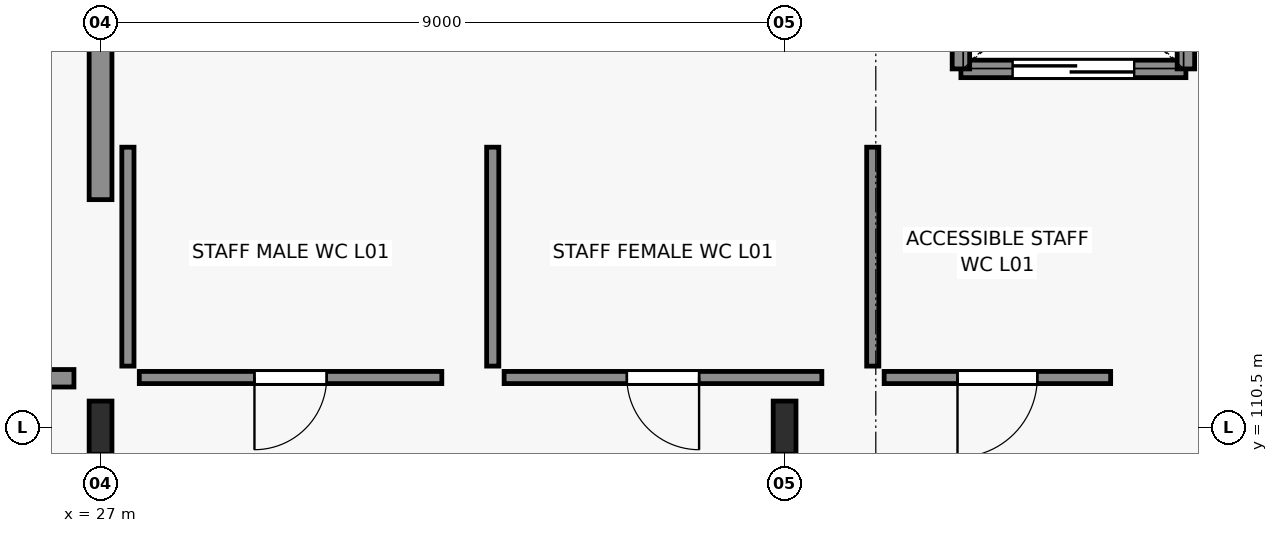
"""IFC4 building model, lengths in metres.
Left out: names, types, materials, properties, quantities, classifications, styles, units other than length and angle.
Written with IfcOpenShell. Run it as: python <this file> out.ifc"""

import sys

from ifc_helpers import new_model, si_unit, direction, frame, frame_2d, origin, origin_2d, place, context, subcontext, project, spatial, rectangle, i_section, extrude, element, fill, save


model = new_model("IFC4")
c1 = context("Model", 3, precision=1e-05, world=origin(), true_north=direction((0.0, 1.0)))
c2 = subcontext(c1, "Body", "Model", "MODEL_VIEW")
j1 = project(units=[si_unit("LENGTHUNIT", "METRE"), si_unit("PLANEANGLEUNIT", "RADIAN")], contexts=[c1])
p1 = place(None, origin())
s1 = spatial("IfcSite", under=j1, at=p1, CompositionType="ELEMENT")
p2 = place(p1, origin())
s2 = spatial("IfcBuilding", under=s1, at=p2, CompositionType="ELEMENT")
p3 = place(p2, frame((0.0, 0.0, 4.8)))
s3 = spatial("IfcBuildingStorey", under=s2, at=p3, CompositionType="ELEMENT", Elevation=4.8)
for number, where, z_axis, x_axis in (
    (1, (27.0, 110.5, 0.0), (0.0, 0.0, 1.0), (1.0, 0.0, 0.0)),
    (2, (36.0, 110.5, 0.0), (0.0, 0.0, 1.0), (1.0, 0.0, 0.0)),
):
    element("IfcColumn", number, at=place(p3, frame(where, z_axis=z_axis, x_axis=x_axis)), inside=s3, PredefinedType="COLUMN", context=c2, shape_type="SweptSolid", body=[
        extrude(i_section(OverallWidth=0.3, OverallDepth=0.7, WebThickness=0.017, FlangeThickness=0.032, FilletRadius=0.027, at=origin_2d()), origin(), (0.0, 0.0, 1.0), 4.82),
    ])
p4 = place(p3, frame((27.0, 113.5, 0.0), z_axis=(0.0, 0.0, 1.0), x_axis=(0.0, 1.0, 0.0)))
e3 = element("IfcWall", 3, at=p4, inside=s3, PredefinedType="SHEAR", context=c2, shape_type="SweptSolid", body=[
    extrude(rectangle(XDim=4.825, YDim=0.3, at=frame_2d((2.413, 0.0))), origin(), (0.0, 0.0, 1.0), 4.82),
])
p5 = place(p3, frame((31.49, 111.16, 0.0), z_axis=(0.0, 0.0, 1.0), x_axis=(-1.0, 0.0, 0.0)))
e4 = element("IfcWall", 4, at=p5, inside=s3, PredefinedType="PARTITIONING", context=c2, shape_type="SweptSolid", body=[
    extrude(rectangle(XDim=3.98, YDim=0.16, at=frame_2d((1.99, 0.0))), origin(), (0.0, 0.0, 1.0), 4.55),
])
p6 = place(p5, frame((1.515, 0.0, 0.0)))
e5 = element("IfcOpeningElement", 5, at=p6, cuts=e4, PredefinedType="OPENING", context=c2, shape_type="SweptSolid", body=[
    extrude(rectangle(XDim=0.95, YDim=2.15, at=frame_2d((0.475, 1.075))), frame((0.0, 0.09, 0.0), z_axis=(0.0, -1.0, 0.0), x_axis=(1.0, 0.0, 0.0)), (0.0, 0.0, 1.0), 0.18),
])
p7 = place(p3, frame((27.36, 111.31, 0.0), z_axis=(0.0, 0.0, 1.0), x_axis=(0.0, 1.0, 0.0)))
e6 = element("IfcWall", 6, at=p7, inside=s3, PredefinedType="PARTITIONING", context=c2, shape_type="SweptSolid", body=[
    extrude(rectangle(XDim=2.88, YDim=0.16, at=frame_2d((1.44, 0.0))), origin(), (0.0, 0.0, 1.0), 4.75),
])
p8 = place(p3, frame((36.49, 111.16, 0.0), z_axis=(0.0, 0.0, 1.0), x_axis=(-1.0, 0.0, 0.0)))
e7 = element("IfcWall", 7, at=p8, inside=s3, PredefinedType="PARTITIONING", context=c2, shape_type="SweptSolid", body=[
    extrude(rectangle(XDim=4.18, YDim=0.16, at=frame_2d((2.09, 0.0))), origin(), (0.0, 0.0, 1.0), 4.3),
])
p9 = place(p8, frame((1.615, 0.0, 0.0)))
e8 = element("IfcOpeningElement", 8, at=p9, cuts=e7, PredefinedType="OPENING", context=c2, shape_type="SweptSolid", body=[
    extrude(rectangle(XDim=0.95, YDim=2.15, at=frame_2d((0.475, 1.075))), frame((0.0, 0.09, 0.0), z_axis=(0.0, -1.0, 0.0), x_axis=(1.0, 0.0, 0.0)), (0.0, 0.0, 1.0), 0.18),
])
p10 = place(p3, frame((32.16, 111.31, 0.0), z_axis=(0.0, 0.0, 1.0), x_axis=(0.0, 1.0, 0.0)))
e9 = element("IfcWall", 9, at=p10, inside=s3, PredefinedType="PARTITIONING", context=c2, shape_type="SweptSolid", body=[
    extrude(rectangle(XDim=2.88, YDim=0.16, at=frame_2d((1.44, 0.0))), origin(), (0.0, 0.0, 1.0), 4.75),
])
p11 = place(p3, frame((40.29, 111.16, 0.0), z_axis=(0.0, 0.0, 1.0), x_axis=(-1.0, 0.0, 0.0)))
e10 = element("IfcWall", 10, at=p11, inside=s3, PredefinedType="PARTITIONING", context=c2, shape_type="SweptSolid", body=[
    extrude(rectangle(XDim=2.98, YDim=0.16, at=frame_2d((1.49, 0.0))), origin(), (0.0, 0.0, 1.0), 4.55),
])
p12 = place(p11, frame((0.965, 0.0, 0.0)))
e11 = element("IfcOpeningElement", 11, at=p12, cuts=e10, PredefinedType="OPENING", context=c2, shape_type="SweptSolid", body=[
    extrude(rectangle(XDim=1.05, YDim=2.2, at=frame_2d((0.525, 1.1))), frame((0.0, 0.09, 0.0), z_axis=(0.0, -1.0, 0.0), x_axis=(1.0, 0.0, 0.0)), (0.0, 0.0, 1.0), 0.18),
])
p13 = place(p3, frame((37.16, 111.31, 0.0), z_axis=(0.0, 0.0, 1.0), x_axis=(0.0, 1.0, 0.0)))
e12 = element("IfcWall", 12, at=p13, inside=s3, PredefinedType="PARTITIONING", context=c2, shape_type="SweptSolid", body=[
    extrude(rectangle(XDim=2.88, YDim=0.16, at=frame_2d((1.44, 0.0))), origin(), (0.0, 0.0, 1.0), 4.75),
])
p14 = place(p3, frame((41.28, 115.22, 0.0), z_axis=(0.0, 0.0, 1.0), x_axis=(-1.0, 0.0, 0.0)))
e13 = element("IfcWall", 13, at=p14, inside=s3, PredefinedType="SOLIDWALL", context=c2, shape_type="SweptSolid", body=[
    extrude(rectangle(XDim=2.96, YDim=0.23, at=frame_2d((1.48, 0.0))), origin(), (0.0, 0.0, 1.0), 4.55),
])
p15 = place(p14, frame((0.68, 0.0, 0.0)))
e14 = element("IfcOpeningElement", 14, at=p15, cuts=e13, PredefinedType="OPENING", context=c2, shape_type="SweptSolid", body=[
    extrude(rectangle(XDim=1.6, YDim=2.3, at=frame_2d((0.8, 1.15))), frame((0.0, 0.125, 0.0), z_axis=(0.0, -1.0, 0.0), x_axis=(1.0, 0.0, 0.0)), (0.0, 0.0, 1.0), 0.25),
])
for number, where, z_axis, x_axis in (
    (15, (38.32, 115.22, 0.0), (0.0, 0.0, 1.0), (0.0, 1.0, 0.0)),
    (16, (41.28, 117.78, 0.0), (0.0, 0.0, 1.0), (0.0, -1.0, 0.0)),
):
    element("IfcWall", number, at=place(p3, frame(where, z_axis=z_axis, x_axis=x_axis)), inside=s3, PredefinedType="SOLIDWALL", context=c2, shape_type="SweptSolid", body=[
        extrude(rectangle(XDim=2.56, YDim=0.23, at=frame_2d((1.28, 0.0))), origin(), (0.0, 0.0, 1.0), 4.76),
    ])
p16 = place(p3, frame((15.3, 111.15, 0.0), z_axis=(0.0, 0.0, 1.0), x_axis=(1.0, 0.0, 0.0)))
e17 = element("IfcWall", 17, at=p16, inside=s3, PredefinedType="SOLIDWALL", context=c2, shape_type="SweptSolid", body=[
    extrude(rectangle(XDim=11.35, YDim=0.23, at=frame_2d((5.675, 0.0))), origin(), (0.0, 0.0, 1.0), 4.3),
])
p17 = place(p16, frame((0.55, 0.0, 0.0)))
e18 = element("IfcOpeningElement", 18, at=p17, cuts=e17, PredefinedType="OPENING", context=c2, shape_type="SweptSolid", body=[
    extrude(rectangle(XDim=1.8, YDim=2.3, at=frame_2d((0.9, 1.15))), frame((0.0, 0.125, 0.0), z_axis=(0.0, -1.0, 0.0), x_axis=(1.0, 0.0, 0.0)), (0.0, 0.0, 1.0), 0.25),
])
p18 = place(p6, origin())
e19 = element("IfcDoor", 19, at=p18, inside=s3, OperationType="SINGLE_SWING_RIGHT", PredefinedType="DOOR", context=c2, shape_type="SweptSolid", body=[
    extrude(rectangle(XDim=0.95, YDim=2.15, at=frame_2d((0.475, 1.075))), frame((0.0, 0.025, 0.0), z_axis=(0.0, -1.0, 0.0), x_axis=(1.0, 0.0, 0.0)), (0.0, 0.0, 1.0), 0.05),
])
fill(e5, e19)
p19 = place(p9, origin())
e20 = element("IfcDoor", 20, at=p19, inside=s3, OperationType="SINGLE_SWING_LEFT", PredefinedType="DOOR", context=c2, shape_type="SweptSolid", body=[
    extrude(rectangle(XDim=0.95, YDim=2.15, at=frame_2d((0.475, 1.075))), frame((0.0, 0.025, 0.0), z_axis=(0.0, -1.0, 0.0), x_axis=(1.0, 0.0, 0.0)), (0.0, 0.0, 1.0), 0.05),
])
fill(e8, e20)
p20 = place(p12, origin())
e21 = element("IfcDoor", 21, at=p20, inside=s3, OperationType="SINGLE_SWING_RIGHT", PredefinedType="DOOR", context=c2, shape_type="SweptSolid", body=[
    extrude(rectangle(XDim=1.05, YDim=2.2, at=frame_2d((0.525, 1.1))), frame((0.0, 0.025, 0.0), z_axis=(0.0, -1.0, 0.0), x_axis=(1.0, 0.0, 0.0)), (0.0, 0.0, 1.0), 0.05),
])
fill(e11, e21)
p21 = place(p15, origin())
e22 = element("IfcDoor", 22, at=p21, inside=s3, OperationType="DOUBLE_DOOR_SLIDING", PredefinedType="DOOR", context=c2, shape_type="SweptSolid", body=[
    extrude(rectangle(XDim=1.6, YDim=2.3, at=frame_2d((0.8, 1.15))), frame((0.0, 0.025, 0.0), z_axis=(0.0, -1.0, 0.0), x_axis=(1.0, 0.0, 0.0)), (0.0, 0.0, 1.0), 0.05),
])
fill(e14, e22)
save(model, sys.argv[1])
